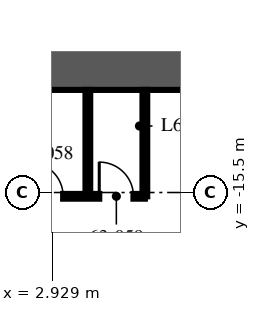
"""IFC4 building model, lengths in metres.
Left out: names, types, materials, properties, quantities, classifications, styles, units other than length and angle.
Written with IfcOpenShell. Run it as: python <this file> out.ifc"""

import sys

from ifc_helpers import new_model, si_unit, direction, frame, frame_2d, origin, place, context, subcontext, project, spatial, rectangle, extrude, element, fill, save


model = new_model("IFC4")
c1 = context("Model", 3, precision=1e-05, world=origin(), true_north=direction((0.0, 1.0)))
c2 = subcontext(c1, "Body", "Model", "MODEL_VIEW")
j1 = project(units=[si_unit("LENGTHUNIT", "METRE"), si_unit("PLANEANGLEUNIT", "RADIAN")], contexts=[c1])
p1 = place(None, origin())
s1 = spatial("IfcSite", under=j1, at=p1, CompositionType="ELEMENT")
p2 = place(p1, origin())
s2 = spatial("IfcBuilding", under=s1, at=p2, CompositionType="ELEMENT")
p3 = place(p2, frame((0.0, 0.0, 252.0)))
s3 = spatial("IfcBuildingStorey", under=s2, at=p3, CompositionType="ELEMENT", Elevation=252.0)
p4 = place(p3, frame((-15.5, -12.0, -0.25), z_axis=(0.0, 0.0, 1.0), x_axis=(1.0, 0.0, 0.0)))
e1 = element("IfcWall", 1, at=p4, inside=s3, PredefinedType="SHEAR", context=c2, shape_type="SweptSolid", body=[
    extrude(rectangle(XDim=31.0, YDim=1.6, at=frame_2d((15.5, 0.0))), origin(), (0.0, 0.0, 1.0), 3.75),
])
p5 = place(p3, frame((1.664, -15.6, 0.0), z_axis=(0.0, 0.0, 1.0), x_axis=(1.0, 0.0, 0.0)))
e2 = element("IfcWall", 2, at=p5, inside=s3, PredefinedType="PARTITIONING", context=c2, shape_type="SweptSolid", body=[
    extrude(rectangle(XDim=3.7, YDim=0.125, at=frame_2d((1.85, 0.0))), origin(), (0.0, 0.0, 1.0), 2.81),
])
p6 = place(p5, frame((0.65, 0.0, 0.0)))
e3 = element("IfcOpeningElement", 3, at=p6, cuts=e2, PredefinedType="OPENING", context=c2, shape_type="SweptSolid", body=[
    extrude(rectangle(XDim=0.9, YDim=2.1, at=frame_2d((0.45, 1.05))), frame((0.0, 0.073, 0.0), z_axis=(0.0, -1.0, 0.0), x_axis=(1.0, 0.0, 0.0)), (0.0, 0.0, 1.0), 0.145),
])
p7 = place(p5, frame((2.5, 0.0, 0.0)))
e4 = element("IfcOpeningElement", 4, at=p7, cuts=e2, PredefinedType="OPENING", context=c2, shape_type="SweptSolid", body=[
    extrude(rectangle(XDim=0.9, YDim=2.1, at=frame_2d((0.45, 1.05))), frame((0.0, 0.073, 0.0), z_axis=(0.0, -1.0, 0.0), x_axis=(1.0, 0.0, 0.0)), (0.0, 0.0, 1.0), 0.145),
])
for number, where, z_axis, x_axis in (
    (5, (3.864, -12.8, 0.0), (0.0, 0.0, 1.0), (0.0, -1.0, 0.0)),
    (6, (5.364, -12.8, 0.0), (0.0, 0.0, 1.0), (0.0, -1.0, 0.0)),
):
    element("IfcWall", number, at=place(p3, frame(where, z_axis=z_axis, x_axis=x_axis)), inside=s3, PredefinedType="PARTITIONING", context=c2, shape_type="SweptSolid", body=[
        extrude(rectangle(XDim=2.8, YDim=0.125, at=frame_2d((1.4, 0.0))), origin(), (0.0, 0.0, 1.0), 3.5),
    ])
p8 = place(p6, origin())
e7 = element("IfcDoor", 7, at=p8, inside=s3, OperationType="SINGLE_SWING_LEFT", PredefinedType="DOOR", context=c2, shape_type="SweptSolid", body=[
    extrude(rectangle(XDim=0.9, YDim=2.1, at=frame_2d((0.45, 1.05))), frame((0.0, 0.025, 0.0), z_axis=(0.0, -1.0, 0.0), x_axis=(1.0, 0.0, 0.0)), (0.0, 0.0, 1.0), 0.05),
])
fill(e3, e7)
p9 = place(p7, origin())
e8 = element("IfcDoor", 8, at=p9, inside=s3, OperationType="SINGLE_SWING_LEFT", PredefinedType="DOOR", context=c2, shape_type="SweptSolid", body=[
    extrude(rectangle(XDim=0.9, YDim=2.1, at=frame_2d((0.45, 1.05))), frame((0.0, 0.025, 0.0), z_axis=(0.0, -1.0, 0.0), x_axis=(1.0, 0.0, 0.0)), (0.0, 0.0, 1.0), 0.05),
])
fill(e4, e8)
save(model, sys.argv[1])
